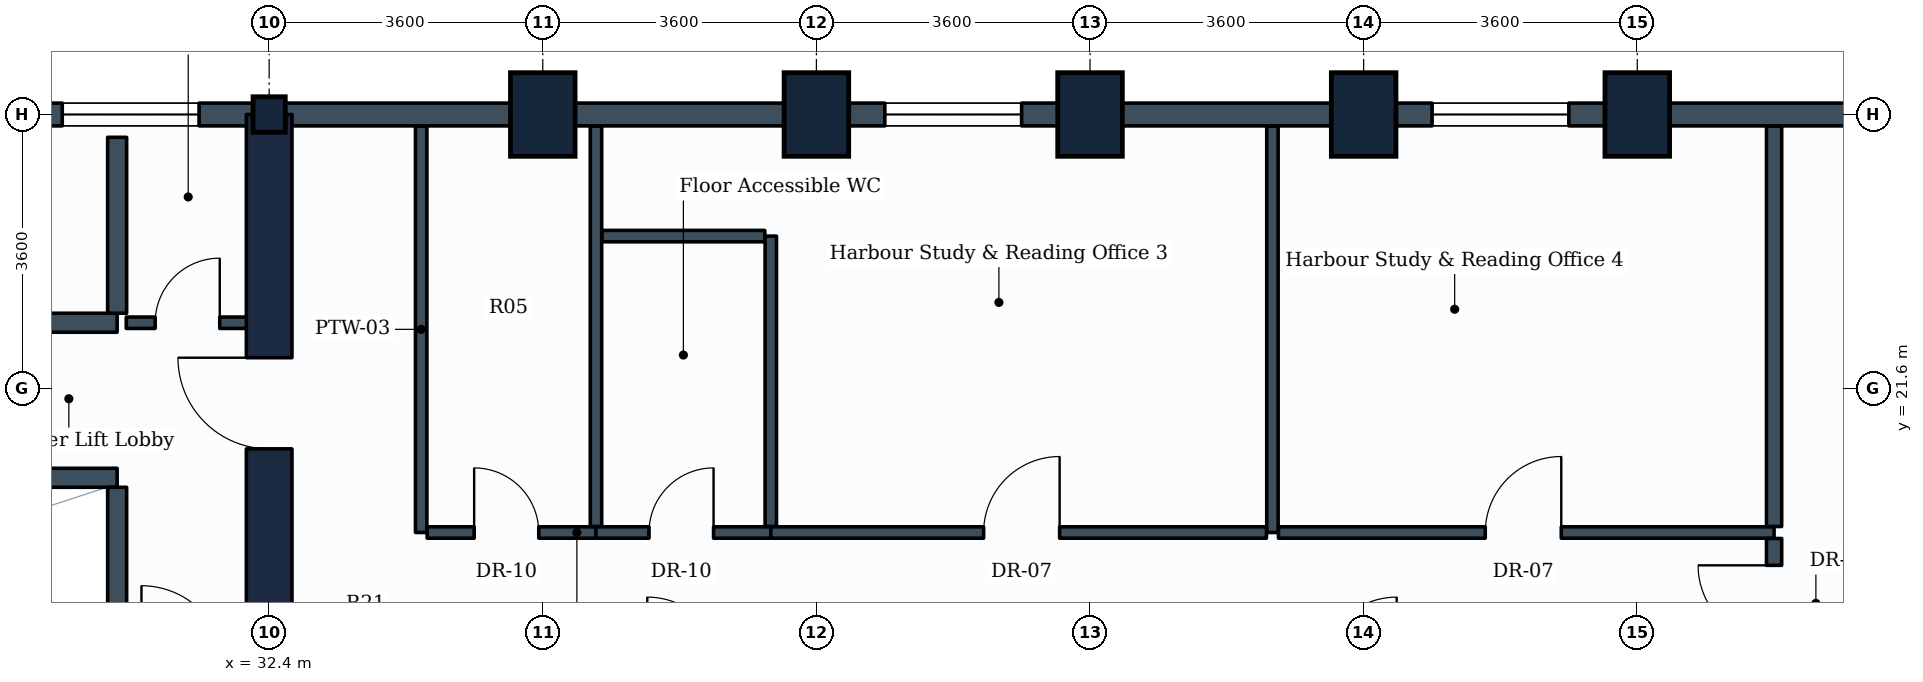
"""IFC4 building model, lengths in metres.
Left out: names, types, materials, properties, quantities, classifications, styles, units other than length and angle.
Written with IfcOpenShell. Run it as: python <this file> out.ifc"""

import sys

from ifc_helpers import new_model, si_unit, direction, frame, frame_2d, origin, origin_2d, place, context, subcontext, project, spatial, rectangle, i_section, extrude, element, fill, save


model = new_model("IFC4")
c1 = context("Model", 3, precision=1e-05, world=origin(), true_north=direction((0.0, 1.0)))
c2 = subcontext(c1, "Body", "Model", "MODEL_VIEW")
j1 = project(units=[si_unit("LENGTHUNIT", "METRE"), si_unit("PLANEANGLEUNIT", "RADIAN")], contexts=[c1])
p1 = place(None, origin())
s1 = spatial("IfcSite", under=j1, at=p1, CompositionType="ELEMENT")
p2 = place(p1, origin())
s2 = spatial("IfcBuilding", under=s1, at=p2, CompositionType="ELEMENT")
p3 = place(p2, frame((0.0, 0.0, 103.5)))
s3 = spatial("IfcBuildingStorey", under=s2, at=p3, CompositionType="ELEMENT", Elevation=103.5)
p4 = place(p3, frame((32.4, 25.2, 0.0), z_axis=(0.0, 0.0, 1.0), x_axis=(1.0, 0.0, 0.0)))
e1 = element("IfcColumn", 1, at=p4, inside=s3, PredefinedType="COLUMN", context=c2, shape_type="SweptSolid", body=[
    extrude(i_section(OverallWidth=0.424, OverallDepth=0.467, WebThickness=0.033, FlangeThickness=0.053, FilletRadius=0.015, at=origin_2d()), origin(), (0.0, 0.0, 1.0), 3.9),
])
for number, where, z_axis, x_axis in (
    (2, (36.0, 25.2, 0.0), (0.0, 0.0, 1.0), (1.0, 0.0, 0.0)),
    (3, (39.6, 25.2, 0.0), (0.0, 0.0, 1.0), (1.0, 0.0, 0.0)),
    (4, (43.2, 25.2, 0.0), (0.0, 0.0, 1.0), (1.0, 0.0, 0.0)),
    (5, (46.8, 25.2, 0.0), (0.0, 0.0, 1.0), (1.0, 0.0, 0.0)),
    (6, (50.4, 25.2, 0.0), (0.0, 0.0, 1.0), (1.0, 0.0, 0.0)),
):
    element("IfcColumn", number, at=place(p3, frame(where, z_axis=z_axis, x_axis=x_axis)), inside=s3, PredefinedType="COLUMN", context=c2, shape_type="SweptSolid", body=[
        extrude(rectangle(XDim=0.85, YDim=1.1, at=origin_2d()), origin(), (0.0, 0.0, 1.0), 3.9),
    ])
p5 = place(p3, frame((50.4, 25.2, 0.0), z_axis=(0.0, 0.0, 1.0), x_axis=(1.0, 0.0, 0.0)))
e7 = element("IfcWall", 7, at=p5, inside=s3, PredefinedType="STANDARD", context=c2, shape_type="SweptSolid", body=[
    extrude(rectangle(XDim=3.6, YDim=0.3, at=frame_2d((1.8, 0.0))), origin(), (0.0, 0.0, 1.0), 2.93),
])
p6 = place(p3, frame((46.8, 25.2, 0.0), z_axis=(0.0, 0.0, 1.0), x_axis=(1.0, 0.0, 0.0)))
e8 = element("IfcWall", 8, at=p6, inside=s3, PredefinedType="STANDARD", context=c2, shape_type="SweptSolid", body=[
    extrude(rectangle(XDim=3.6, YDim=0.3, at=frame_2d((1.8, 0.0))), origin(), (0.0, 0.0, 1.0), 2.93),
])
p7 = place(p6, frame((0.9, 0.0, 0.85)))
e9 = element("IfcOpeningElement", 9, at=p7, cuts=e8, PredefinedType="OPENING", context=c2, shape_type="SweptSolid", body=[
    extrude(rectangle(XDim=1.8, YDim=1.35, at=frame_2d((0.9, 0.675))), frame((0.0, 0.16, 0.0), z_axis=(0.0, -1.0, 0.0), x_axis=(1.0, 0.0, 0.0)), (0.0, 0.0, 1.0), 0.32),
])
p8 = place(p3, frame((43.2, 25.2, 0.0), z_axis=(0.0, 0.0, 1.0), x_axis=(1.0, 0.0, 0.0)))
e10 = element("IfcWall", 10, at=p8, inside=s3, PredefinedType="STANDARD", context=c2, shape_type="SweptSolid", body=[
    extrude(rectangle(XDim=3.6, YDim=0.3, at=frame_2d((1.8, 0.0))), origin(), (0.0, 0.0, 1.0), 2.93),
])
p9 = place(p3, frame((39.6, 25.2, 0.0), z_axis=(0.0, 0.0, 1.0), x_axis=(1.0, 0.0, 0.0)))
e11 = element("IfcWall", 11, at=p9, inside=s3, PredefinedType="STANDARD", context=c2, shape_type="SweptSolid", body=[
    extrude(rectangle(XDim=3.6, YDim=0.3, at=frame_2d((1.8, 0.0))), origin(), (0.0, 0.0, 1.0), 2.93),
])
p10 = place(p9, frame((0.9, 0.0, 0.85)))
e12 = element("IfcOpeningElement", 12, at=p10, cuts=e11, PredefinedType="OPENING", context=c2, shape_type="SweptSolid", body=[
    extrude(rectangle(XDim=1.8, YDim=1.35, at=frame_2d((0.9, 0.675))), frame((0.0, 0.16, 0.0), z_axis=(0.0, -1.0, 0.0), x_axis=(1.0, 0.0, 0.0)), (0.0, 0.0, 1.0), 0.32),
])
for number, where, z_axis, x_axis in (
    (13, (36.0, 25.2, 0.0), (0.0, 0.0, 1.0), (1.0, 0.0, 0.0)),
    (14, (32.4, 25.2, 0.0), (0.0, 0.0, 1.0), (1.0, 0.0, 0.0)),
):
    element("IfcWall", number, at=place(p3, frame(where, z_axis=z_axis, x_axis=x_axis)), inside=s3, PredefinedType="STANDARD", context=c2, shape_type="SweptSolid", body=[
        extrude(rectangle(XDim=3.6, YDim=0.3, at=frame_2d((1.8, 0.0))), origin(), (0.0, 0.0, 1.0), 2.93),
    ])
p11 = place(p3, frame((28.8, 25.2, 0.0), z_axis=(0.0, 0.0, 1.0), x_axis=(1.0, 0.0, 0.0)))
e15 = element("IfcWall", 15, at=p11, inside=s3, PredefinedType="STANDARD", context=c2, shape_type="SweptSolid", body=[
    extrude(rectangle(XDim=3.6, YDim=0.3, at=frame_2d((1.8, 0.0))), origin(), (0.0, 0.0, 1.0), 3.635),
])
p12 = place(p11, frame((0.878, 0.0, 0.85)))
e16 = element("IfcOpeningElement", 16, at=p12, cuts=e15, PredefinedType="OPENING", context=c2, shape_type="SweptSolid", body=[
    extrude(rectangle(XDim=1.8, YDim=1.35, at=frame_2d((0.9, 0.675))), frame((0.0, 0.16, 0.0), z_axis=(0.0, -1.0, 0.0), x_axis=(1.0, 0.0, 0.0)), (0.0, 0.0, 1.0), 0.32),
])
p13 = place(p3, frame((32.4, 10.8, 0.0), z_axis=(0.0, 0.0, 1.0), x_axis=(0.0, 1.0, 0.0)))
e17 = element("IfcWall", 17, at=p13, inside=s3, PredefinedType="SHEAR", context=c2, shape_type="SweptSolid", body=[
    extrude(rectangle(XDim=14.4, YDim=0.6, at=frame_2d((7.2, 0.0))), origin(), (0.0, 0.0, 1.0), 3.65),
])
p14 = place(p13, frame((4.35, 0.0, 0.0)))
e18 = element("IfcOpeningElement", 18, at=p14, cuts=e17, PredefinedType="OPENING", context=c2, shape_type="SweptSolid", body=[
    extrude(rectangle(XDim=1.2, YDim=2.1, at=frame_2d((0.6, 1.05))), frame((0.0, 0.31, 0.0), z_axis=(0.0, -1.0, 0.0), x_axis=(1.0, 0.0, 0.0)), (0.0, 0.0, 1.0), 0.62),
])
p15 = place(p13, frame((10.0, 0.0, 0.0)))
e19 = element("IfcOpeningElement", 19, at=p15, cuts=e17, PredefinedType="OPENING", context=c2, shape_type="SweptSolid", body=[
    extrude(rectangle(XDim=1.2, YDim=2.1, at=frame_2d((0.6, 1.05))), frame((0.0, 0.31, 0.0), z_axis=(0.0, -1.0, 0.0), x_axis=(1.0, 0.0, 0.0)), (0.0, 0.0, 1.0), 0.62),
])
p16 = place(p3, frame((23.18, 20.42, 0.0), z_axis=(0.0, 0.0, 1.0), x_axis=(1.0, 0.0, 0.0)))
e20 = element("IfcWall", 20, at=p16, inside=s3, PredefinedType="PARTITIONING", context=c2, shape_type="SweptSolid", body=[
    extrude(rectangle(XDim=7.22, YDim=0.25, at=frame_2d((3.61, 0.0))), origin(), (0.0, 0.0, 1.0), 3.635),
])
p17 = place(p3, frame((30.4, 18.025, 0.0), z_axis=(0.0, 0.0, 1.0), x_axis=(0.0, 1.0, 0.0)))
e21 = element("IfcWall", 21, at=p17, inside=s3, PredefinedType="PARTITIONING", context=c2, shape_type="SweptSolid", body=[
    extrude(rectangle(XDim=2.27, YDim=0.25, at=frame_2d((1.135, 0.0))), origin(), (0.0, 0.0, 1.0), 3.635),
])
p18 = place(p3, frame((23.18, 22.46, 0.0), z_axis=(0.0, 0.0, 1.0), x_axis=(1.0, 0.0, 0.0)))
e22 = element("IfcWall", 22, at=p18, inside=s3, PredefinedType="PARTITIONING", context=c2, shape_type="SweptSolid", body=[
    extrude(rectangle(XDim=7.22, YDim=0.25, at=frame_2d((3.61, 0.0))), origin(), (0.0, 0.0, 1.0), 3.635),
])
p19 = place(p3, frame((30.4, 22.585, 0.0), z_axis=(0.0, 0.0, 1.0), x_axis=(0.0, 1.0, 0.0)))
e23 = element("IfcWall", 23, at=p19, inside=s3, PredefinedType="PARTITIONING", context=c2, shape_type="SweptSolid", body=[
    extrude(rectangle(XDim=2.315, YDim=0.25, at=frame_2d((1.157, 0.0))), origin(), (0.0, 0.0, 1.0), 3.635),
])
p20 = place(p3, frame((30.52, 22.46, 0.0), z_axis=(0.0, 0.0, 1.0), x_axis=(1.0, 0.0, 0.0)))
e24 = element("IfcWall", 24, at=p20, inside=s3, PredefinedType="PARTITIONING", context=c2, shape_type="SweptSolid", body=[
    extrude(rectangle(XDim=1.63, YDim=0.15, at=frame_2d((0.815, 0.0))), origin(), (0.0, 0.0, 1.0), 3.635),
])
p21 = place(p20, frame((0.38, 0.0, 0.0)))
e25 = element("IfcOpeningElement", 25, at=p21, cuts=e24, PredefinedType="OPENING", context=c2, shape_type="SweptSolid", body=[
    extrude(rectangle(XDim=0.85, YDim=2.1, at=frame_2d((0.425, 1.05))), frame((0.0, 0.085, 0.0), z_axis=(0.0, -1.0, 0.0), x_axis=(1.0, 0.0, 0.0)), (0.0, 0.0, 1.0), 0.17),
])
p22 = place(p3, frame((34.4, 19.7, 0.0), z_axis=(0.0, 0.0, 1.0), x_axis=(0.0, 1.0, 0.0)))
e26 = element("IfcWall", 26, at=p22, inside=s3, PredefinedType="PARTITIONING", context=c2, shape_type="SweptSolid", body=[
    extrude(rectangle(XDim=5.346, YDim=0.15, at=frame_2d((2.673, 0.0))), origin(), (0.0, 0.0, 1.0), 2.93),
])
p23 = place(p3, frame((34.479, 19.7, 0.0), z_axis=(0.0, 0.0, 1.0), x_axis=(1.0, 0.0, 0.0)))
e27 = element("IfcWall", 27, at=p23, inside=s3, PredefinedType="PARTITIONING", context=c2, shape_type="SweptSolid", body=[
    extrude(rectangle(XDim=2.221, YDim=0.15, at=frame_2d((1.11, 0.0))), origin(), (0.0, 0.0, 1.0), 3.18),
])
p24 = place(p23, frame((0.618, 0.0, 0.0)))
e28 = element("IfcOpeningElement", 28, at=p24, cuts=e27, PredefinedType="OPENING", context=c2, shape_type="SweptSolid", body=[
    extrude(rectangle(XDim=0.85, YDim=2.1, at=frame_2d((0.425, 1.05))), frame((0.0, 0.085, 0.0), z_axis=(0.0, -1.0, 0.0), x_axis=(1.0, 0.0, 0.0)), (0.0, 0.0, 1.0), 0.17),
])
p25 = place(p3, frame((36.7, 19.779, 0.0), z_axis=(0.0, 0.0, 1.0), x_axis=(0.0, 1.0, 0.0)))
e29 = element("IfcWall", 29, at=p25, inside=s3, PredefinedType="PARTITIONING", context=c2, shape_type="SweptSolid", body=[
    extrude(rectangle(XDim=5.267, YDim=0.15, at=frame_2d((2.633, 0.0))), origin(), (0.0, 0.0, 1.0), 2.93),
])
p26 = place(p3, frame((36.7, 19.7, 0.0), z_axis=(0.0, 0.0, 1.0), x_axis=(1.0, 0.0, 0.0)))
e30 = element("IfcWall", 30, at=p26, inside=s3, PredefinedType="PARTITIONING", context=c2, shape_type="SweptSolid", body=[
    extrude(rectangle(XDim=2.3, YDim=0.15, at=frame_2d((1.15, 0.0))), origin(), (0.0, 0.0, 1.0), 3.635),
])
p27 = place(p26, frame((0.697, 0.0, 0.0)))
e31 = element("IfcOpeningElement", 31, at=p27, cuts=e30, PredefinedType="OPENING", context=c2, shape_type="SweptSolid", body=[
    extrude(rectangle(XDim=0.85, YDim=2.1, at=frame_2d((0.425, 1.05))), frame((0.0, 0.085, 0.0), z_axis=(0.0, -1.0, 0.0), x_axis=(1.0, 0.0, 0.0)), (0.0, 0.0, 1.0), 0.17),
])
p28 = place(p3, frame((39.0, 19.779, 0.0), z_axis=(0.0, 0.0, 1.0), x_axis=(0.0, 1.0, 0.0)))
e32 = element("IfcWall", 32, at=p28, inside=s3, PredefinedType="PARTITIONING", context=c2, shape_type="SweptSolid", body=[
    extrude(rectangle(XDim=3.821, YDim=0.15, at=frame_2d((1.911, 0.0))), origin(), (0.0, 0.0, 1.0), 3.18),
])
p29 = place(p3, frame((36.779, 23.6, 0.0), z_axis=(0.0, 0.0, 1.0), x_axis=(1.0, 0.0, 0.0)))
e33 = element("IfcWall", 33, at=p29, inside=s3, PredefinedType="PARTITIONING", context=c2, shape_type="SweptSolid", body=[
    extrude(rectangle(XDim=2.142, YDim=0.15, at=frame_2d((1.071, 0.0))), origin(), (0.0, 0.0, 1.0), 3.635),
])
p30 = place(p3, frame((45.6, 19.7, 0.0), z_axis=(0.0, 0.0, 1.0), x_axis=(0.0, 1.0, 0.0)))
e34 = element("IfcWall", 34, at=p30, inside=s3, PredefinedType="PARTITIONING", context=c2, shape_type="SweptSolid", body=[
    extrude(rectangle(XDim=5.346, YDim=0.15, at=frame_2d((2.673, 0.0))), origin(), (0.0, 0.0, 1.0), 2.93),
])
p31 = place(p3, frame((39.0, 19.7, 0.0), z_axis=(0.0, 0.0, 1.0), x_axis=(1.0, 0.0, 0.0)))
e35 = element("IfcWall", 35, at=p31, inside=s3, PredefinedType="PARTITIONING", context=c2, shape_type="SweptSolid", body=[
    extrude(rectangle(XDim=6.521, YDim=0.15, at=frame_2d((3.26, 0.0))), origin(), (0.0, 0.0, 1.0), 3.19),
])
p32 = place(p31, frame((2.8, 0.0, 0.0)))
e36 = element("IfcOpeningElement", 36, at=p32, cuts=e35, PredefinedType="OPENING", context=c2, shape_type="SweptSolid", body=[
    extrude(rectangle(XDim=1.0, YDim=2.1, at=frame_2d((0.5, 1.05))), frame((0.0, 0.085, 0.0), z_axis=(0.0, -1.0, 0.0), x_axis=(1.0, 0.0, 0.0)), (0.0, 0.0, 1.0), 0.17),
])
p33 = place(p3, frame((45.679, 19.7, 0.0), z_axis=(0.0, 0.0, 1.0), x_axis=(1.0, 0.0, 0.0)))
e37 = element("IfcWall", 37, at=p33, inside=s3, PredefinedType="PARTITIONING", context=c2, shape_type="SweptSolid", body=[
    extrude(rectangle(XDim=6.521, YDim=0.15, at=frame_2d((3.26, 0.0))), origin(), (0.0, 0.0, 1.0), 3.19),
])
p34 = place(p33, frame((2.721, 0.0, 0.0)))
e38 = element("IfcOpeningElement", 38, at=p34, cuts=e37, PredefinedType="OPENING", context=c2, shape_type="SweptSolid", body=[
    extrude(rectangle(XDim=1.0, YDim=2.1, at=frame_2d((0.5, 1.05))), frame((0.0, 0.085, 0.0), z_axis=(0.0, -1.0, 0.0), x_axis=(1.0, 0.0, 0.0)), (0.0, 0.0, 1.0), 0.17),
])
p35 = place(p3, frame((52.2, 19.779, 0.0), z_axis=(0.0, 0.0, 1.0), x_axis=(0.0, 1.0, 0.0)))
e39 = element("IfcWall", 39, at=p35, inside=s3, PredefinedType="PARTITIONING", context=c2, shape_type="SweptSolid", body=[
    extrude(rectangle(XDim=5.267, YDim=0.2, at=frame_2d((2.633, 0.0))), origin(), (0.0, 0.0, 1.0), 2.93),
])
p36 = place(p3, frame((52.2, 17.929, 0.0), z_axis=(0.0, 0.0, 1.0), x_axis=(0.0, 1.0, 0.0)))
e40 = element("IfcWall", 40, at=p36, inside=s3, PredefinedType="PARTITIONING", context=c2, shape_type="SweptSolid", body=[
    extrude(rectangle(XDim=1.692, YDim=0.2, at=frame_2d((0.846, 0.0))), origin(), (0.0, 0.0, 1.0), 3.635),
])
p37 = place(p36, frame((0.339, 0.0, 0.0)))
e41 = element("IfcOpeningElement", 41, at=p37, cuts=e40, PredefinedType="OPENING", context=c2, shape_type="SweptSolid", body=[
    extrude(rectangle(XDim=1.0, YDim=2.1, at=frame_2d((0.5, 1.05))), frame((0.0, 0.11, 0.0), z_axis=(0.0, -1.0, 0.0), x_axis=(1.0, 0.0, 0.0)), (0.0, 0.0, 1.0), 0.22),
])
p38 = place(p7, origin())
e42 = element("IfcWindow", 42, at=p38, inside=s3, PartitioningType="SINGLE_PANEL", PredefinedType="WINDOW", context=c2, shape_type="SweptSolid", body=[
    extrude(rectangle(XDim=1.8, YDim=1.35, at=frame_2d((0.9, 0.675))), frame((0.0, 0.03, 0.0), z_axis=(0.0, -1.0, 0.0), x_axis=(1.0, 0.0, 0.0)), (0.0, 0.0, 1.0), 0.06),
])
fill(e9, e42)
p39 = place(p10, origin())
e43 = element("IfcWindow", 43, at=p39, inside=s3, PartitioningType="SINGLE_PANEL", PredefinedType="WINDOW", context=c2, shape_type="SweptSolid", body=[
    extrude(rectangle(XDim=1.8, YDim=1.35, at=frame_2d((0.9, 0.675))), frame((0.0, 0.03, 0.0), z_axis=(0.0, -1.0, 0.0), x_axis=(1.0, 0.0, 0.0)), (0.0, 0.0, 1.0), 0.06),
])
fill(e12, e43)
p40 = place(p12, origin())
e44 = element("IfcWindow", 44, at=p40, inside=s3, PartitioningType="SINGLE_PANEL", PredefinedType="WINDOW", context=c2, shape_type="SweptSolid", body=[
    extrude(rectangle(XDim=1.8, YDim=1.35, at=frame_2d((0.9, 0.675))), frame((0.0, 0.03, 0.0), z_axis=(0.0, -1.0, 0.0), x_axis=(1.0, 0.0, 0.0)), (0.0, 0.0, 1.0), 0.06),
])
fill(e16, e44)
p41 = place(p15, origin())
e45 = element("IfcDoor", 45, at=p41, inside=s3, OperationType="SINGLE_SWING_RIGHT", PredefinedType="DOOR", context=c2, shape_type="SweptSolid", body=[
    extrude(rectangle(XDim=1.2, YDim=2.1, at=frame_2d((0.6, 1.05))), frame((0.0, 0.025, 0.0), z_axis=(0.0, -1.0, 0.0), x_axis=(1.0, 0.0, 0.0)), (0.0, 0.0, 1.0), 0.05),
])
fill(e19, e45)
p42 = place(p21, origin())
e46 = element("IfcDoor", 46, at=p42, inside=s3, OperationType="SINGLE_SWING_RIGHT", PredefinedType="DOOR", context=c2, shape_type="SweptSolid", body=[
    extrude(rectangle(XDim=0.85, YDim=2.1, at=frame_2d((0.425, 1.05))), frame((0.0, 0.025, 0.0), z_axis=(0.0, -1.0, 0.0), x_axis=(1.0, 0.0, 0.0)), (0.0, 0.0, 1.0), 0.05),
])
fill(e25, e46)
p43 = place(p24, origin())
e47 = element("IfcDoor", 47, at=p43, inside=s3, OperationType="SINGLE_SWING_LEFT", PredefinedType="DOOR", context=c2, shape_type="SweptSolid", body=[
    extrude(rectangle(XDim=0.85, YDim=2.1, at=frame_2d((0.425, 1.05))), frame((0.0, 0.025, 0.0), z_axis=(0.0, -1.0, 0.0), x_axis=(1.0, 0.0, 0.0)), (0.0, 0.0, 1.0), 0.05),
])
fill(e28, e47)
p44 = place(p27, origin())
e48 = element("IfcDoor", 48, at=p44, inside=s3, OperationType="SINGLE_SWING_RIGHT", PredefinedType="DOOR", context=c2, shape_type="SweptSolid", body=[
    extrude(rectangle(XDim=0.85, YDim=2.1, at=frame_2d((0.425, 1.05))), frame((0.0, 0.025, 0.0), z_axis=(0.0, -1.0, 0.0), x_axis=(1.0, 0.0, 0.0)), (0.0, 0.0, 1.0), 0.05),
])
fill(e31, e48)
p45 = place(p32, origin())
e49 = element("IfcDoor", 49, at=p45, inside=s3, OperationType="SINGLE_SWING_RIGHT", PredefinedType="DOOR", context=c2, shape_type="SweptSolid", body=[
    extrude(rectangle(XDim=1.0, YDim=2.1, at=frame_2d((0.5, 1.05))), frame((0.0, 0.025, 0.0), z_axis=(0.0, -1.0, 0.0), x_axis=(1.0, 0.0, 0.0)), (0.0, 0.0, 1.0), 0.05),
])
fill(e36, e49)
p46 = place(p34, origin())
e50 = element("IfcDoor", 50, at=p46, inside=s3, OperationType="SINGLE_SWING_RIGHT", PredefinedType="DOOR", context=c2, shape_type="SweptSolid", body=[
    extrude(rectangle(XDim=1.0, YDim=2.1, at=frame_2d((0.5, 1.05))), frame((0.0, 0.025, 0.0), z_axis=(0.0, -1.0, 0.0), x_axis=(1.0, 0.0, 0.0)), (0.0, 0.0, 1.0), 0.05),
])
fill(e38, e50)
p47 = place(p37, origin())
e51 = element("IfcDoor", 51, at=p47, inside=s3, OperationType="SINGLE_SWING_RIGHT", PredefinedType="DOOR", context=c2, shape_type="SweptSolid", body=[
    extrude(rectangle(XDim=1.0, YDim=2.1, at=frame_2d((0.5, 1.05))), frame((0.0, 0.025, 0.0), z_axis=(0.0, -1.0, 0.0), x_axis=(1.0, 0.0, 0.0)), (0.0, 0.0, 1.0), 0.05),
])
fill(e41, e51)
save(model, sys.argv[1])
